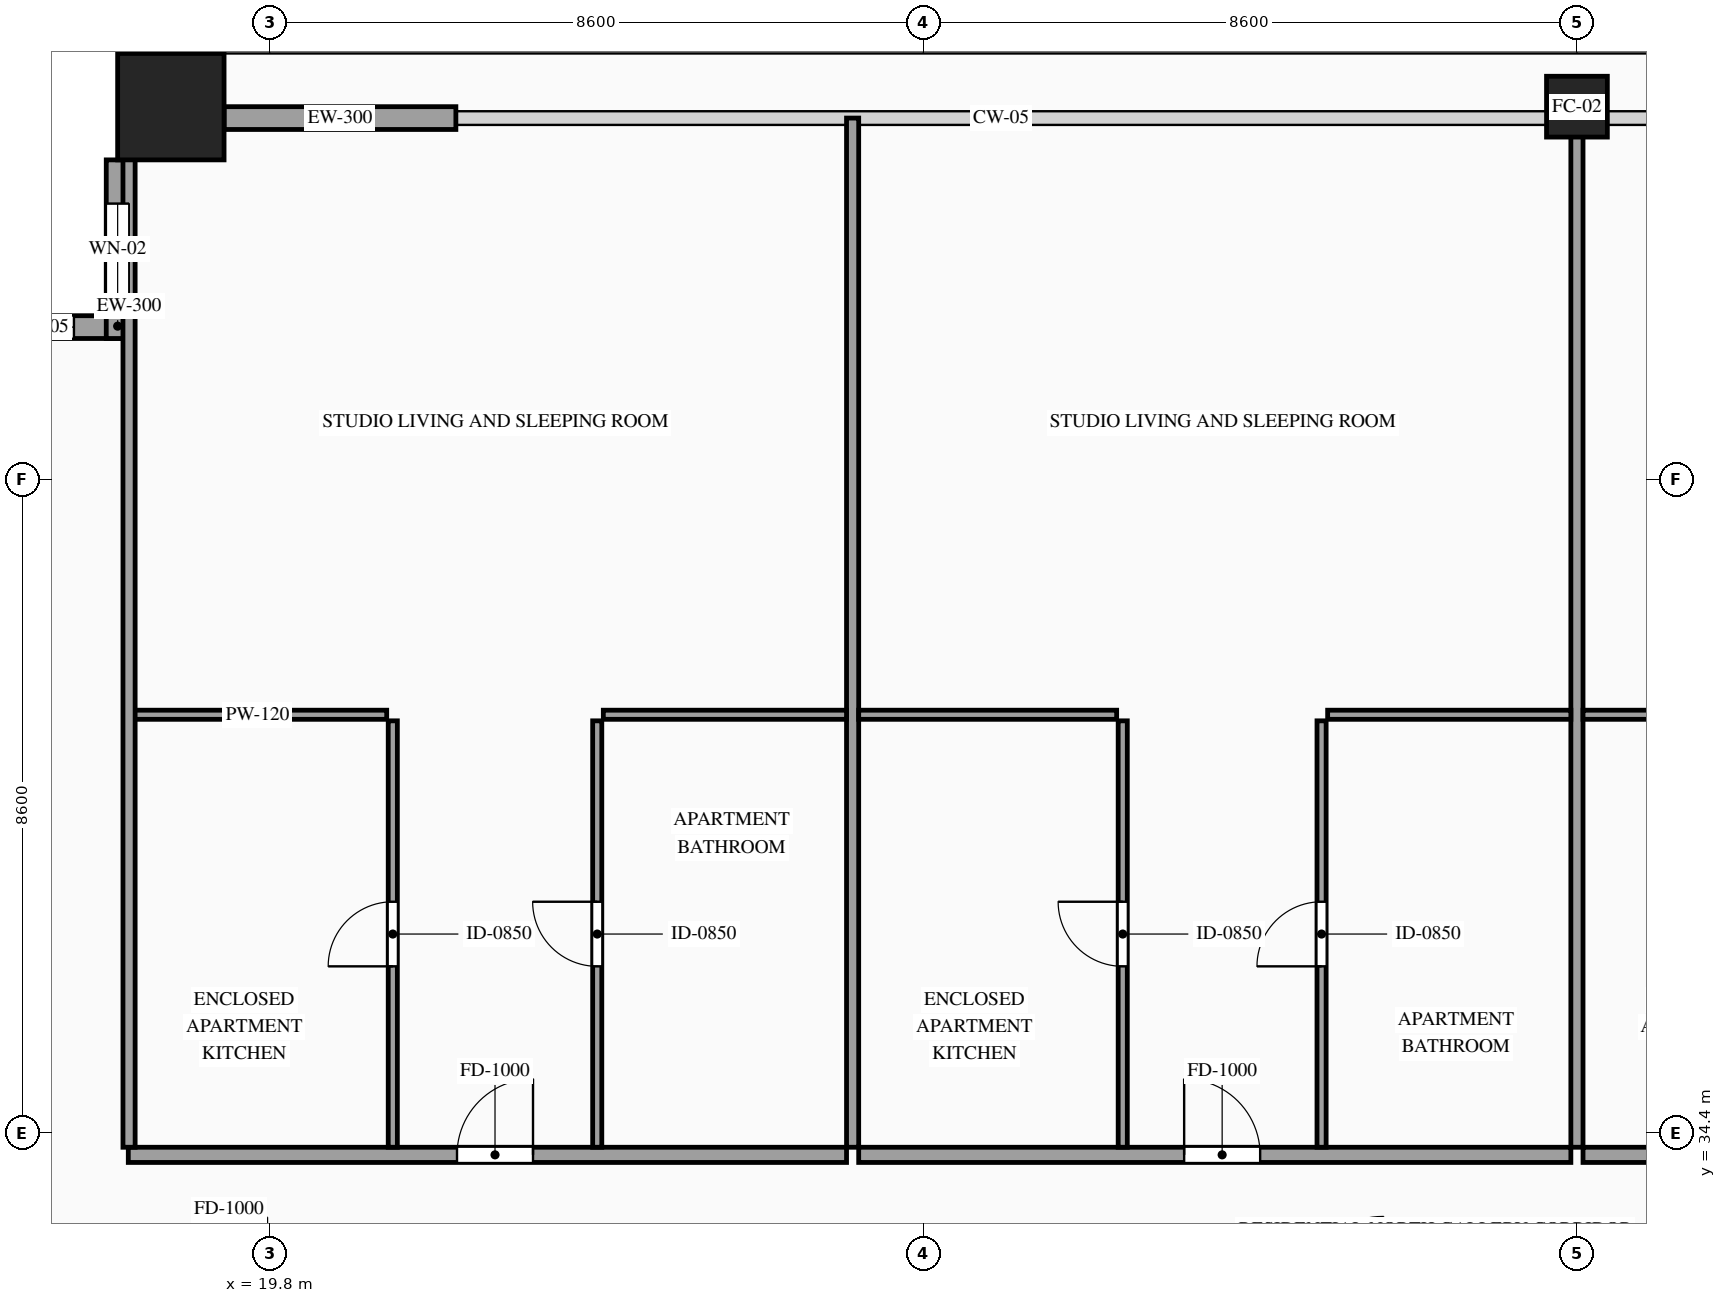
"""IFC4 building model, lengths in metres.
Left out: names, types, materials, properties, quantities, classifications, styles, units other than length and angle.
Written with IfcOpenShell. Run it as: python <this file> out.ifc"""

import sys

from ifc_helpers import new_model, si_unit, direction, frame, frame_2d, origin, origin_2d, place, context, subcontext, project, spatial, rectangle, hollow_rectangle, extrude, source, transform, mapped, element, fill, save


model = new_model("IFC4")
c1 = context("Model", 3, precision=1e-05, world=origin(), true_north=direction((0.0, 1.0)))
c2 = subcontext(c1, "Body", "Model", "MODEL_VIEW")
j1 = project(units=[si_unit("LENGTHUNIT", "METRE"), si_unit("PLANEANGLEUNIT", "RADIAN")], contexts=[c1])
p1 = place(None, origin())
s1 = spatial("IfcSite", under=j1, at=p1, CompositionType="ELEMENT")
p2 = place(p1, origin())
s2 = spatial("IfcBuilding", under=s1, at=p2, CompositionType="ELEMENT")
p3 = place(p2, frame((0.0, 0.0, 181.0)))
s3 = spatial("IfcBuildingStorey", under=s2, at=p3, CompositionType="ELEMENT", Elevation=181.0)
m1 = source(origin(), c2, "Body", "SweptSolid", [
    extrude(hollow_rectangle(XDim=1.4, YDim=1.4, WallThickness=0.06, at=origin_2d()), origin(), (0.0, 0.0, 1.0), 3.5),
])
p4 = place(p3, frame((18.5, 47.9, 0.0), z_axis=(0.0, 0.0, 1.0), x_axis=(1.0, 0.0, 0.0)))
e1 = element("IfcColumn", 1, at=p4, inside=s3, PredefinedType="COLUMN", context=c2, shape_type="MappedRepresentation", body=[
    mapped(m1, transform((0.0, 0.0, 0.0), scale=1.0)),
])
m2 = source(origin(), c2, "Body", "SweptSolid", [
    extrude(hollow_rectangle(XDim=0.8, YDim=0.8, WallThickness=0.036, at=origin_2d()), origin(), (0.0, 0.0, 1.0), 3.5),
])
p5 = place(p3, frame((37.0, 47.9, 0.0), z_axis=(0.0, 0.0, 1.0), x_axis=(1.0, 0.0, 0.0)))
e2 = element("IfcColumn", 2, at=p5, inside=s3, PredefinedType="COLUMN", context=c2, shape_type="MappedRepresentation", body=[
    mapped(m2, transform((0.0, 0.0, 0.0), scale=1.0)),
])
p6 = place(p3, frame((17.95, 45.0, 0.0), z_axis=(0.0, 0.0, 1.0), x_axis=(-1.0, 0.0, 0.0)))
e3 = element("IfcWall", 3, at=p6, inside=s3, PredefinedType="SOLIDWALL", context=c2, shape_type="SweptSolid", body=[
    extrude(rectangle(XDim=2.35, YDim=0.3, at=frame_2d((1.175, 0.0))), origin(), (0.0, 0.0, 1.0), 3.28),
])
p7 = place(p6, frame((0.725, 0.0, 0.85)))
e4 = element("IfcOpeningElement", 4, at=p7, cuts=e3, PredefinedType="OPENING", context=c2, shape_type="SweptSolid", body=[
    extrude(rectangle(XDim=0.9, YDim=1.5, at=frame_2d((0.45, 0.75))), frame((0.0, 0.165, 0.0), z_axis=(0.0, -1.0, 0.0), x_axis=(1.0, 0.0, 0.0)), (0.0, 0.0, 1.0), 0.33),
])
p8 = place(p3, frame((17.8, 47.2, 0.0), z_axis=(0.0, 0.0, 1.0), x_axis=(0.0, -1.0, 0.0)))
e5 = element("IfcWall", 5, at=p8, inside=s3, PredefinedType="SOLIDWALL", context=c2, shape_type="SweptSolid", body=[
    extrude(rectangle(XDim=2.35, YDim=0.3, at=frame_2d((1.175, 0.0))), origin(), (0.0, 0.0, 1.0), 3.28),
])
p9 = place(p8, frame((0.575, 0.0, 0.85)))
e6 = element("IfcOpeningElement", 6, at=p9, cuts=e5, PredefinedType="OPENING", context=c2, shape_type="SweptSolid", body=[
    extrude(rectangle(XDim=1.2, YDim=2.1, at=frame_2d((0.6, 1.05))), frame((0.0, 0.165, 0.0), z_axis=(0.0, -1.0, 0.0), x_axis=(1.0, 0.0, 0.0)), (0.0, 0.0, 1.0), 0.33),
])
m3 = source(origin(), c2, "Body", "SweptSolid", [
    extrude(rectangle(XDim=3.05, YDim=0.3, at=frame_2d((1.525, 0.0))), origin(), (0.0, 0.0, 1.0), 2.835),
])
p10 = place(p3, frame((19.2, 47.75, 0.0), z_axis=(0.0, 0.0, 1.0), x_axis=(1.0, 0.0, 0.0)))
e7 = element("IfcWall", 7, at=p10, inside=s3, PredefinedType="SOLIDWALL", context=c2, shape_type="MappedRepresentation", body=[
    mapped(m3, transform((0.0, 0.0, 0.0), scale=1.0)),
])
p11 = place(p3, frame((17.94, 34.11, 0.0), z_axis=(0.0, 0.0, 1.0), x_axis=(1.0, 0.0, 0.0)))
e8 = element("IfcWall", 8, at=p11, inside=s3, PredefinedType="PARTITIONING", context=c2, shape_type="SweptSolid", body=[
    extrude(rectangle(XDim=9.45, YDim=0.2, at=frame_2d((4.725, 0.0))), origin(), (0.0, 0.0, 1.0), 3.28),
])
p12 = place(p11, frame((4.325, 0.0, 0.0)))
e9 = element("IfcOpeningElement", 9, at=p12, cuts=e8, PredefinedType="OPENING", context=c2, shape_type="SweptSolid", body=[
    extrude(rectangle(XDim=1.0, YDim=2.2, at=frame_2d((0.5, 1.1))), frame((0.0, 0.115, 0.0), z_axis=(0.0, -1.0, 0.0), x_axis=(1.0, 0.0, 0.0)), (0.0, 0.0, 1.0), 0.23),
])
m4 = source(origin(), c2, "Body", "SweptSolid", [
    extrude(rectangle(XDim=13.54, YDim=0.16, at=frame_2d((6.77, 0.0))), origin(), (0.0, 0.0, 1.0), 3.28),
])
p13 = place(p3, frame((27.47, 34.21, 0.0), z_axis=(0.0, 0.0, 1.0), x_axis=(0.0, 1.0, 0.0)))
e10 = element("IfcWall", 10, at=p13, inside=s3, PredefinedType="PARTITIONING", context=c2, shape_type="MappedRepresentation", body=[
    mapped(m4, transform((0.0, 0.0, 0.0), scale=1.0)),
])
m5 = source(origin(), c2, "Body", "SweptSolid", [
    extrude(rectangle(XDim=3.4, YDim=0.12, at=frame_2d((1.7, 0.0))), origin(), (0.0, 0.0, 1.0), 3.28),
])
p14 = place(p3, frame((17.94, 39.9, 0.0), z_axis=(0.0, 0.0, 1.0), x_axis=(1.0, 0.0, 0.0)))
e11 = element("IfcWall", 11, at=p14, inside=s3, PredefinedType="PARTITIONING", context=c2, shape_type="MappedRepresentation", body=[
    mapped(m5, transform((0.0, 0.0, 0.0), scale=1.0)),
])
p15 = place(p3, frame((21.42, 34.21, 0.0), z_axis=(0.0, 0.0, 1.0), x_axis=(0.0, 1.0, 0.0)))
e12 = element("IfcWall", 12, at=p15, inside=s3, PredefinedType="PARTITIONING", context=c2, shape_type="SweptSolid", body=[
    extrude(rectangle(XDim=5.61, YDim=0.12, at=frame_2d((2.805, 0.0))), origin(), (0.0, 0.0, 1.0), 3.28),
])
p16 = place(p15, frame((2.38, 0.0, 0.0)))
e13 = element("IfcOpeningElement", 13, at=p16, cuts=e12, PredefinedType="OPENING", context=c2, shape_type="SweptSolid", body=[
    extrude(rectangle(XDim=0.85, YDim=2.1, at=frame_2d((0.425, 1.05))), frame((0.0, 0.075, 0.0), z_axis=(0.0, -1.0, 0.0), x_axis=(1.0, 0.0, 0.0)), (0.0, 0.0, 1.0), 0.15),
])
m6 = source(origin(), c2, "Body", "SweptSolid", [
    extrude(rectangle(XDim=3.2, YDim=0.12, at=frame_2d((1.6, 0.0))), origin(), (0.0, 0.0, 1.0), 2.875),
])
p17 = place(p3, frame((24.19, 39.9, 0.0), z_axis=(0.0, 0.0, 1.0), x_axis=(1.0, 0.0, 0.0)))
e14 = element("IfcWall", 14, at=p17, inside=s3, PredefinedType="PARTITIONING", context=c2, shape_type="MappedRepresentation", body=[
    mapped(m6, transform((0.0, 0.0, 0.0), scale=1.0)),
])
p18 = place(p3, frame((24.11, 34.21, 0.0), z_axis=(0.0, 0.0, 1.0), x_axis=(0.0, 1.0, 0.0)))
e15 = element("IfcWall", 15, at=p18, inside=s3, PredefinedType="PARTITIONING", context=c2, shape_type="SweptSolid", body=[
    extrude(rectangle(XDim=5.61, YDim=0.12, at=frame_2d((2.805, 0.0))), origin(), (0.0, 0.0, 1.0), 3.28),
])
p19 = place(p18, frame((2.38, 0.0, 0.0)))
e16 = element("IfcOpeningElement", 16, at=p19, cuts=e15, PredefinedType="OPENING", context=c2, shape_type="SweptSolid", body=[
    extrude(rectangle(XDim=0.85, YDim=2.1, at=frame_2d((0.425, 1.05))), frame((0.0, 0.075, 0.0), z_axis=(0.0, -1.0, 0.0), x_axis=(1.0, 0.0, 0.0)), (0.0, 0.0, 1.0), 0.15),
])
p20 = place(p3, frame((27.55, 34.11, 0.0), z_axis=(0.0, 0.0, 1.0), x_axis=(1.0, 0.0, 0.0)))
e17 = element("IfcWall", 17, at=p20, inside=s3, PredefinedType="PARTITIONING", context=c2, shape_type="SweptSolid", body=[
    extrude(rectangle(XDim=9.37, YDim=0.2, at=frame_2d((4.685, 0.0))), origin(), (0.0, 0.0, 1.0), 3.28),
])
p21 = place(p20, frame((4.282, 0.0, 0.0)))
e18 = element("IfcOpeningElement", 18, at=p21, cuts=e17, PredefinedType="OPENING", context=c2, shape_type="SweptSolid", body=[
    extrude(rectangle(XDim=1.0, YDim=2.2, at=frame_2d((0.5, 1.1))), frame((0.0, 0.115, 0.0), z_axis=(0.0, -1.0, 0.0), x_axis=(1.0, 0.0, 0.0)), (0.0, 0.0, 1.0), 0.23),
])
m7 = source(origin(), c2, "Body", "SweptSolid", [
    extrude(rectangle(XDim=13.54, YDim=0.16, at=frame_2d((6.77, 0.0))), origin(), (0.0, 0.0, 1.0), 2.687),
])
p22 = place(p3, frame((37.0, 34.21, 0.0), z_axis=(0.0, 0.0, 1.0), x_axis=(0.0, 1.0, 0.0)))
e19 = element("IfcWall", 19, at=p22, inside=s3, PredefinedType="PARTITIONING", context=c2, shape_type="MappedRepresentation", body=[
    mapped(m7, transform((0.0, 0.0, 0.0), scale=1.0)),
])
m8 = source(origin(), c2, "Body", "SweptSolid", [
    extrude(rectangle(XDim=3.394, YDim=0.12, at=frame_2d((1.697, 0.0))), origin(), (0.0, 0.0, 1.0), 2.875),
])
p23 = place(p3, frame((27.55, 39.9, 0.0), z_axis=(0.0, 0.0, 1.0), x_axis=(1.0, 0.0, 0.0)))
e20 = element("IfcWall", 20, at=p23, inside=s3, PredefinedType="PARTITIONING", context=c2, shape_type="MappedRepresentation", body=[
    mapped(m8, transform((0.0, 0.0, 0.0), scale=1.0)),
])
p24 = place(p3, frame((31.024, 34.21, 0.0), z_axis=(0.0, 0.0, 1.0), x_axis=(0.0, 1.0, 0.0)))
e21 = element("IfcWall", 21, at=p24, inside=s3, PredefinedType="PARTITIONING", context=c2, shape_type="SweptSolid", body=[
    extrude(rectangle(XDim=5.61, YDim=0.12, at=frame_2d((2.805, 0.0))), origin(), (0.0, 0.0, 1.0), 3.28),
])
p25 = place(p24, frame((2.38, 0.0, 0.0)))
e22 = element("IfcOpeningElement", 22, at=p25, cuts=e21, PredefinedType="OPENING", context=c2, shape_type="SweptSolid", body=[
    extrude(rectangle(XDim=0.85, YDim=2.1, at=frame_2d((0.425, 1.05))), frame((0.0, 0.075, 0.0), z_axis=(0.0, -1.0, 0.0), x_axis=(1.0, 0.0, 0.0)), (0.0, 0.0, 1.0), 0.15),
])
p26 = place(p3, frame((33.72, 39.9, 0.0), z_axis=(0.0, 0.0, 1.0), x_axis=(1.0, 0.0, 0.0)))
e23 = element("IfcWall", 23, at=p26, inside=s3, PredefinedType="PARTITIONING", context=c2, shape_type="MappedRepresentation", body=[
    mapped(m6, transform((0.0, 0.0, 0.0), scale=1.0)),
])
p27 = place(p3, frame((33.64, 34.21, 0.0), z_axis=(0.0, 0.0, 1.0), x_axis=(0.0, 1.0, 0.0)))
e24 = element("IfcWall", 24, at=p27, inside=s3, PredefinedType="PARTITIONING", context=c2, shape_type="SweptSolid", body=[
    extrude(rectangle(XDim=5.61, YDim=0.12, at=frame_2d((2.805, 0.0))), origin(), (0.0, 0.0, 1.0), 3.28),
])
p28 = place(p27, frame((2.38, 0.0, 0.0)))
e25 = element("IfcOpeningElement", 25, at=p28, cuts=e24, PredefinedType="OPENING", context=c2, shape_type="SweptSolid", body=[
    extrude(rectangle(XDim=0.85, YDim=2.1, at=frame_2d((0.425, 1.05))), frame((0.0, 0.075, 0.0), z_axis=(0.0, -1.0, 0.0), x_axis=(1.0, 0.0, 0.0)), (0.0, 0.0, 1.0), 0.15),
])
p29 = place(p3, frame((37.08, 34.11, 0.0), z_axis=(0.0, 0.0, 1.0), x_axis=(1.0, 0.0, 0.0)))
e26 = element("IfcWall", 26, at=p29, inside=s3, PredefinedType="PARTITIONING", context=c2, shape_type="SweptSolid", body=[
    extrude(rectangle(XDim=9.37, YDim=0.2, at=frame_2d((4.685, 0.0))), origin(), (0.0, 0.0, 1.0), 3.28),
])
p30 = place(p29, frame((4.282, 0.0, 0.0)))
e27 = element("IfcOpeningElement", 27, at=p30, cuts=e26, PredefinedType="OPENING", context=c2, shape_type="SweptSolid", body=[
    extrude(rectangle(XDim=1.0, YDim=2.2, at=frame_2d((0.5, 1.1))), frame((0.0, 0.115, 0.0), z_axis=(0.0, -1.0, 0.0), x_axis=(1.0, 0.0, 0.0)), (0.0, 0.0, 1.0), 0.23),
])
p31 = place(p3, frame((37.08, 39.9, 0.0), z_axis=(0.0, 0.0, 1.0), x_axis=(1.0, 0.0, 0.0)))
e28 = element("IfcWall", 28, at=p31, inside=s3, PredefinedType="PARTITIONING", context=c2, shape_type="MappedRepresentation", body=[
    mapped(m8, transform((0.0, 0.0, 0.0), scale=1.0)),
])
m9 = source(origin(), c2, "Body", "SweptSolid", [
    extrude(rectangle(XDim=13.39, YDim=0.16, at=frame_2d((6.695, 0.0))), origin(), (0.0, 0.0, 1.0), 3.28),
])
p32 = place(p3, frame((17.95, 34.21, 0.0), z_axis=(0.0, 0.0, 1.0), x_axis=(0.0, 1.0, 0.0)))
e29 = element("IfcWall", 29, at=p32, inside=s3, PredefinedType="PARTITIONING", context=c2, shape_type="MappedRepresentation", body=[
    mapped(m9, transform((0.0, 0.0, 0.0), scale=1.0)),
])
m10 = source(origin(), c2, "Body", "SweptSolid", [
    extrude(rectangle(XDim=0.9, YDim=1.5, at=frame_2d((0.45, 0.75))), frame((0.0, 0.03, 0.0), z_axis=(0.0, -1.0, 0.0), x_axis=(1.0, 0.0, 0.0)), (0.0, 0.0, 1.0), 0.06),
])
p33 = place(p7, origin())
e30 = element("IfcWindow", 30, at=p33, inside=s3, PartitioningType="SINGLE_PANEL", PredefinedType="WINDOW", context=c2, shape_type="MappedRepresentation", body=[
    mapped(m10, transform((0.0, 0.0, 0.0), scale=1.0)),
])
fill(e4, e30)
m11 = source(origin(), c2, "Body", "SweptSolid", [
    extrude(rectangle(XDim=1.2, YDim=2.1, at=frame_2d((0.6, 1.05))), frame((0.0, 0.03, 0.0), z_axis=(0.0, -1.0, 0.0), x_axis=(1.0, 0.0, 0.0)), (0.0, 0.0, 1.0), 0.06),
])
p34 = place(p9, origin())
e31 = element("IfcWindow", 31, at=p34, inside=s3, PartitioningType="SINGLE_PANEL", PredefinedType="WINDOW", context=c2, shape_type="MappedRepresentation", body=[
    mapped(m11, transform((0.0, 0.0, 0.0), scale=1.0)),
])
fill(e6, e31)
m12 = source(origin(), c2, "Body", "SweptSolid", [
    extrude(rectangle(XDim=1.0, YDim=2.2, at=frame_2d((0.5, 1.1))), frame((0.0, 0.025, 0.0), z_axis=(0.0, -1.0, 0.0), x_axis=(1.0, 0.0, 0.0)), (0.0, 0.0, 1.0), 0.05),
])
p35 = place(p12, origin())
e32 = element("IfcDoor", 32, at=p35, inside=s3, OperationType="SINGLE_SWING_RIGHT", PredefinedType="DOOR", context=c2, shape_type="MappedRepresentation", body=[
    mapped(m12, transform((0.0, 0.0, 0.0), scale=1.0)),
])
fill(e9, e32)
m13 = source(origin(), c2, "Body", "SweptSolid", [
    extrude(rectangle(XDim=0.85, YDim=2.1, at=frame_2d((0.425, 1.05))), frame((0.0, 0.025, 0.0), z_axis=(0.0, -1.0, 0.0), x_axis=(1.0, 0.0, 0.0)), (0.0, 0.0, 1.0), 0.05),
])
p36 = place(p16, origin())
e33 = element("IfcDoor", 33, at=p36, inside=s3, OperationType="SINGLE_SWING_LEFT", PredefinedType="DOOR", context=c2, shape_type="MappedRepresentation", body=[
    mapped(m13, transform((0.0, 0.0, 0.0), scale=1.0)),
])
fill(e13, e33)
p37 = place(p19, origin())
e34 = element("IfcDoor", 34, at=p37, inside=s3, OperationType="SINGLE_SWING_RIGHT", PredefinedType="DOOR", context=c2, shape_type="MappedRepresentation", body=[
    mapped(m13, transform((0.0, 0.0, 0.0), scale=1.0)),
])
fill(e16, e34)
p38 = place(p21, origin())
e35 = element("IfcDoor", 35, at=p38, inside=s3, OperationType="SINGLE_SWING_LEFT", PredefinedType="DOOR", context=c2, shape_type="MappedRepresentation", body=[
    mapped(m12, transform((0.0, 0.0, 0.0), scale=1.0)),
])
fill(e18, e35)
p39 = place(p25, origin())
e36 = element("IfcDoor", 36, at=p39, inside=s3, OperationType="SINGLE_SWING_RIGHT", PredefinedType="DOOR", context=c2, shape_type="MappedRepresentation", body=[
    mapped(m13, transform((0.0, 0.0, 0.0), scale=1.0)),
])
fill(e22, e36)
p40 = place(p28, origin())
e37 = element("IfcDoor", 37, at=p40, inside=s3, OperationType="SINGLE_SWING_LEFT", PredefinedType="DOOR", context=c2, shape_type="MappedRepresentation", body=[
    mapped(m13, transform((0.0, 0.0, 0.0), scale=1.0)),
])
fill(e25, e37)
save(model, sys.argv[1])
